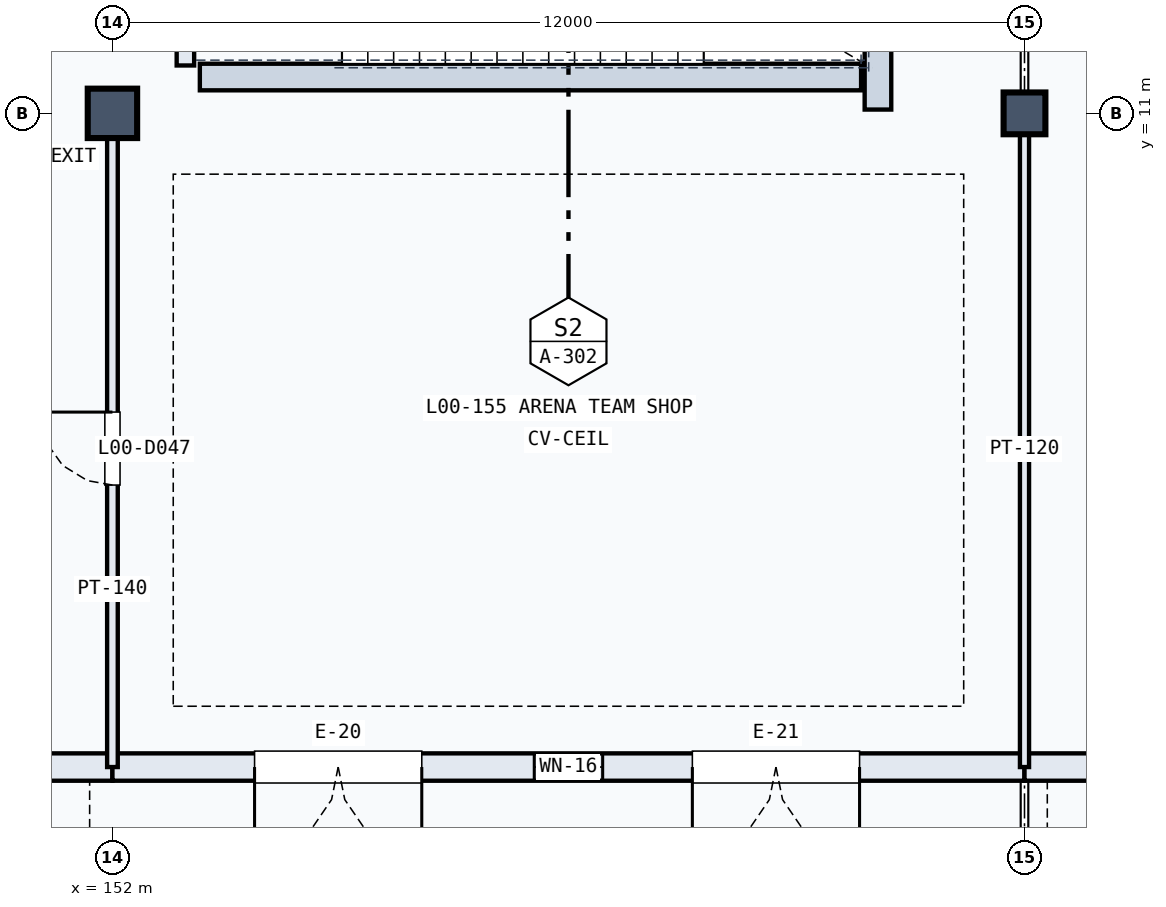
"""IFC4 building model, lengths in metres.
Left out: names, types, materials, properties, quantities, classifications, styles, units other than length and angle.
Written with IfcOpenShell. Run it as: python <this file> out.ifc"""

import sys

from ifc_helpers import new_model, si_unit, direction, frame, frame_2d, origin, origin_2d, place, context, subcontext, project, spatial, rectangle, extrude, element, fill, save


model = new_model("IFC4")
c1 = context("Model", 3, precision=1e-05, world=origin(), true_north=direction((0.0, 1.0)))
c2 = subcontext(c1, "Body", "Model", "MODEL_VIEW")
j1 = project(units=[si_unit("LENGTHUNIT", "METRE"), si_unit("PLANEANGLEUNIT", "RADIAN")], contexts=[c1])
p1 = place(None, origin())
s1 = spatial("IfcSite", under=j1, at=p1, CompositionType="ELEMENT")
p2 = place(p1, origin())
s2 = spatial("IfcBuilding", under=s1, at=p2, CompositionType="ELEMENT")
p3 = place(p2, origin())
s3 = spatial("IfcBuildingStorey", under=s2, at=p3, CompositionType="ELEMENT", Elevation=0.0)
p4 = place(p3, frame((152.0, 11.0, 0.0), z_axis=(0.0, 0.0, 1.0), x_axis=(1.0, 0.0, 0.0)))
e1 = element("IfcColumn", 1, at=p4, inside=s3, PredefinedType="COLUMN", context=c2, shape_type="SweptSolid", body=[
    extrude(rectangle(XDim=0.65, YDim=0.65, at=origin_2d()), origin(), (0.0, 0.0, 1.0), 5.4),
])
p5 = place(p3, frame((164.0, 11.0, 0.0), z_axis=(0.0, 0.0, 1.0), x_axis=(1.0, 0.0, 0.0)))
e2 = element("IfcColumn", 2, at=p5, inside=s3, PredefinedType="COLUMN", context=c2, shape_type="SweptSolid", body=[
    extrude(rectangle(XDim=0.55, YDim=0.55, at=origin_2d()), origin(), (0.0, 0.0, 1.0), 5.4),
])
p6 = place(p3, frame((140.0, 2.4, 0.0), z_axis=(0.0, 0.0, 1.0), x_axis=(1.0, 0.0, 0.0)))
e3 = element("IfcWall", 3, at=p6, inside=s3, PredefinedType="SOLIDWALL", context=c2, shape_type="SweptSolid", body=[
    extrude(rectangle(XDim=12.0, YDim=0.36, at=frame_2d((6.0, 0.0))), origin(), (0.0, 0.0, 1.0), 4.35),
])
p7 = place(p6, frame((1.87, 0.0, 0.0)))
e4 = element("IfcOpeningElement", 4, at=p7, cuts=e3, PredefinedType="OPENING", context=c2, shape_type="SweptSolid", body=[
    extrude(rectangle(XDim=2.2, YDim=2.35, at=frame_2d((1.1, 1.175))), frame((0.0, 0.19, 0.0), z_axis=(0.0, -1.0, 0.0), x_axis=(1.0, 0.0, 0.0)), (0.0, 0.0, 1.0), 0.38),
])
p8 = place(p6, frame((7.63, 0.0, 0.0)))
e5 = element("IfcOpeningElement", 5, at=p8, cuts=e3, PredefinedType="OPENING", context=c2, shape_type="SweptSolid", body=[
    extrude(rectangle(XDim=2.2, YDim=2.35, at=frame_2d((1.1, 1.175))), frame((0.0, 0.19, 0.0), z_axis=(0.0, -1.0, 0.0), x_axis=(1.0, 0.0, 0.0)), (0.0, 0.0, 1.0), 0.38),
])
p9 = place(p3, frame((152.0, 2.4, 0.0), z_axis=(0.0, 0.0, 1.0), x_axis=(1.0, 0.0, 0.0)))
e6 = element("IfcWall", 6, at=p9, inside=s3, PredefinedType="SOLIDWALL", context=c2, shape_type="SweptSolid", body=[
    extrude(rectangle(XDim=12.0, YDim=0.36, at=frame_2d((6.0, 0.0))), origin(), (0.0, 0.0, 1.0), 4.35),
])
p10 = place(p9, frame((1.87, 0.0, 0.0)))
e7 = element("IfcOpeningElement", 7, at=p10, cuts=e6, PredefinedType="OPENING", context=c2, shape_type="SweptSolid", body=[
    extrude(rectangle(XDim=2.2, YDim=2.35, at=frame_2d((1.1, 1.175))), frame((0.0, 0.19, 0.0), z_axis=(0.0, -1.0, 0.0), x_axis=(1.0, 0.0, 0.0)), (0.0, 0.0, 1.0), 0.38),
])
p11 = place(p9, frame((7.63, 0.0, 0.0)))
e8 = element("IfcOpeningElement", 8, at=p11, cuts=e6, PredefinedType="OPENING", context=c2, shape_type="SweptSolid", body=[
    extrude(rectangle(XDim=2.2, YDim=2.35, at=frame_2d((1.1, 1.175))), frame((0.0, 0.19, 0.0), z_axis=(0.0, -1.0, 0.0), x_axis=(1.0, 0.0, 0.0)), (0.0, 0.0, 1.0), 0.38),
])
p12 = place(p9, frame((5.55, 0.0, 0.8)))
e9 = element("IfcOpeningElement", 9, at=p12, cuts=e6, PredefinedType="OPENING", context=c2, shape_type="SweptSolid", body=[
    extrude(rectangle(XDim=0.9, YDim=1.8, at=frame_2d((0.45, 0.9))), frame((0.0, 0.19, 0.0), z_axis=(0.0, -1.0, 0.0), x_axis=(1.0, 0.0, 0.0)), (0.0, 0.0, 1.0), 0.38),
])
p13 = place(p3, frame((164.0, 2.4, 0.0), z_axis=(0.0, 0.0, 1.0), x_axis=(1.0, 0.0, 0.0)))
e10 = element("IfcWall", 10, at=p13, inside=s3, PredefinedType="SOLIDWALL", context=c2, shape_type="SweptSolid", body=[
    extrude(rectangle(XDim=12.0, YDim=0.36, at=frame_2d((6.0, 0.0))), origin(), (0.0, 0.0, 1.0), 4.43),
])
p14 = place(p13, frame((1.87, 0.0, 0.0)))
e11 = element("IfcOpeningElement", 11, at=p14, cuts=e10, PredefinedType="OPENING", context=c2, shape_type="SweptSolid", body=[
    extrude(rectangle(XDim=2.2, YDim=2.35, at=frame_2d((1.1, 1.175))), frame((0.0, 0.19, 0.0), z_axis=(0.0, -1.0, 0.0), x_axis=(1.0, 0.0, 0.0)), (0.0, 0.0, 1.0), 0.38),
])
p15 = place(p13, frame((7.63, 0.0, 0.0)))
e12 = element("IfcOpeningElement", 12, at=p15, cuts=e10, PredefinedType="OPENING", context=c2, shape_type="SweptSolid", body=[
    extrude(rectangle(XDim=2.2, YDim=2.35, at=frame_2d((1.1, 1.175))), frame((0.0, 0.19, 0.0), z_axis=(0.0, -1.0, 0.0), x_axis=(1.0, 0.0, 0.0)), (0.0, 0.0, 1.0), 0.38),
])
p16 = place(p13, frame((5.0, 0.0, 0.9)))
e13 = element("IfcOpeningElement", 13, at=p16, cuts=e10, PredefinedType="OPENING", context=c2, shape_type="SweptSolid", body=[
    extrude(rectangle(XDim=2.0, YDim=1.65, at=frame_2d((1.0, 0.825))), frame((0.0, 0.19, 0.0), z_axis=(0.0, -1.0, 0.0), x_axis=(1.0, 0.0, 0.0)), (0.0, 0.0, 1.0), 0.38),
])
p17 = place(p3, frame((152.96, 11.63, 0.0), z_axis=(0.0, 0.0, 1.0), x_axis=(0.0, 1.0, 0.0)))
e14 = element("IfcWall", 14, at=p17, inside=s3, PredefinedType="SOLIDWALL", context=c2, shape_type="SweptSolid", body=[
    extrude(rectangle(XDim=4.08, YDim=0.23, at=frame_2d((2.04, 0.0))), origin(), (0.0, 0.0, 1.0), 5.06),
])
p18 = place(p3, frame((162.072, 11.05, 0.0), z_axis=(0.0, 0.0, 1.0), x_axis=(0.0, 1.0, 0.0)))
e15 = element("IfcWall", 15, at=p18, inside=s3, PredefinedType="SOLIDWALL", context=c2, shape_type="SweptSolid", body=[
    extrude(rectangle(XDim=4.54, YDim=0.35, at=frame_2d((2.27, 0.0))), origin(), (0.0, 0.0, 1.0), 5.06),
])
p19 = place(p3, frame((153.15, 11.478, 0.0), z_axis=(0.0, 0.0, 1.0), x_axis=(1.0, 0.0, 0.0)))
e16 = element("IfcWall", 16, at=p19, inside=s3, PredefinedType="SOLIDWALL", context=c2, shape_type="SweptSolid", body=[
    extrude(rectangle(XDim=8.7, YDim=0.35, at=frame_2d((4.35, 0.0))), origin(), (0.0, 0.0, 1.0), 5.06),
])
p20 = place(p3, frame((152.0, 2.4, 0.0), z_axis=(0.0, 0.0, 1.0), x_axis=(0.0, 1.0, 0.0)))
e17 = element("IfcWall", 17, at=p20, inside=s3, PredefinedType="PARTITIONING", context=c2, shape_type="SweptSolid", body=[
    extrude(rectangle(XDim=8.38, YDim=0.14, at=frame_2d((4.19, 0.0))), origin(), (0.0, 0.0, 1.0), 4.3),
])
p21 = place(p20, frame((3.71, 0.0, 0.0)))
e18 = element("IfcOpeningElement", 18, at=p21, cuts=e17, PredefinedType="OPENING", context=c2, shape_type="SweptSolid", body=[
    extrude(rectangle(XDim=0.96, YDim=2.15, at=frame_2d((0.48, 1.075))), frame((0.0, 0.08, 0.0), z_axis=(0.0, -1.0, 0.0), x_axis=(1.0, 0.0, 0.0)), (0.0, 0.0, 1.0), 0.16),
])
p22 = place(p3, frame((164.0, 2.4, 0.0), z_axis=(0.0, 0.0, 1.0), x_axis=(0.0, 1.0, 0.0)))
e19 = element("IfcWall", 19, at=p22, inside=s3, PredefinedType="PARTITIONING", context=c2, shape_type="SweptSolid", body=[
    extrude(rectangle(XDim=8.38, YDim=0.12, at=frame_2d((4.19, 0.0))), origin(), (0.0, 0.0, 1.0), 4.35),
])
p23 = place(p10, frame((2.2, 0.0, 0.0), z_axis=(0.0, 0.0, 1.0), x_axis=(-1.0, 0.0, 0.0)))
e20 = element("IfcDoor", 20, at=p23, inside=s3, OperationType="DOUBLE_DOOR_SINGLE_SWING", PredefinedType="DOOR", context=c2, shape_type="SweptSolid", body=[
    extrude(rectangle(XDim=2.2, YDim=2.35, at=frame_2d((1.1, 1.175))), frame((0.0, 0.025, 0.0), z_axis=(0.0, -1.0, 0.0), x_axis=(1.0, 0.0, 0.0)), (0.0, 0.0, 1.0), 0.05),
])
fill(e7, e20)
p24 = place(p11, frame((2.2, 0.0, 0.0), z_axis=(0.0, 0.0, 1.0), x_axis=(-1.0, 0.0, 0.0)))
e21 = element("IfcDoor", 21, at=p24, inside=s3, OperationType="DOUBLE_DOOR_SINGLE_SWING", PredefinedType="DOOR", context=c2, shape_type="SweptSolid", body=[
    extrude(rectangle(XDim=2.2, YDim=2.35, at=frame_2d((1.1, 1.175))), frame((0.0, 0.025, 0.0), z_axis=(0.0, -1.0, 0.0), x_axis=(1.0, 0.0, 0.0)), (0.0, 0.0, 1.0), 0.05),
])
fill(e8, e21)
p25 = place(p12, origin())
e22 = element("IfcWindow", 22, at=p25, inside=s3, PartitioningType="SINGLE_PANEL", PredefinedType="WINDOW", context=c2, shape_type="SweptSolid", body=[
    extrude(rectangle(XDim=0.9, YDim=1.8, at=frame_2d((0.45, 0.9))), frame((0.0, 0.03, 0.0), z_axis=(0.0, -1.0, 0.0), x_axis=(1.0, 0.0, 0.0)), (0.0, 0.0, 1.0), 0.06),
])
fill(e9, e22)
p26 = place(p21, origin())
e23 = element("IfcDoor", 23, at=p26, inside=s3, OperationType="SINGLE_SWING_RIGHT", PredefinedType="DOOR", context=c2, shape_type="SweptSolid", body=[
    extrude(rectangle(XDim=0.96, YDim=2.15, at=frame_2d((0.48, 1.075))), frame((0.0, 0.025, 0.0), z_axis=(0.0, -1.0, 0.0), x_axis=(1.0, 0.0, 0.0)), (0.0, 0.0, 1.0), 0.05),
])
fill(e18, e23)
save(model, sys.argv[1])
